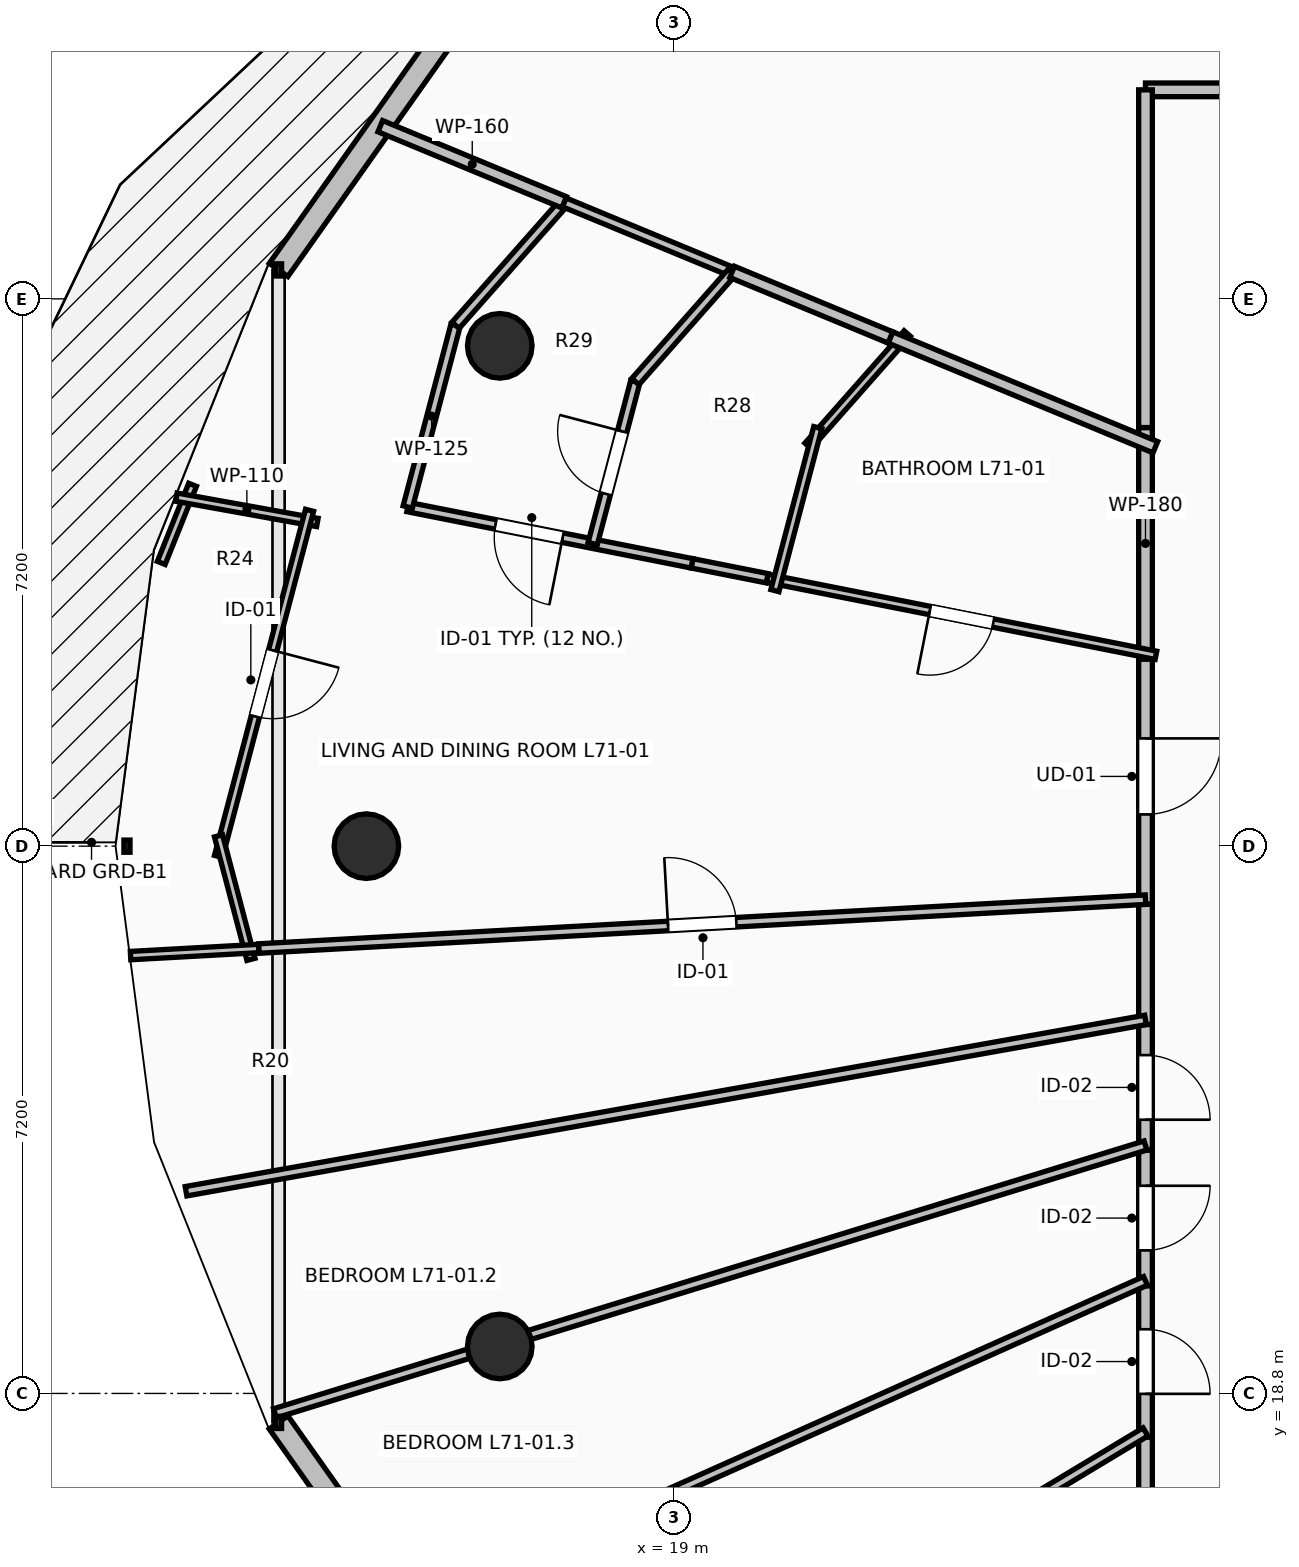
"""IFC4 building model, lengths in metres.
Left out: names, types, materials, properties, quantities, classifications, styles, units other than length and angle.
Written with IfcOpenShell. Run it as: python <this file> out.ifc"""

import sys

from ifc_helpers import new_model, si_unit, direction, frame, frame_2d, origin, origin_2d, place, context, subcontext, project, spatial, rectangle, circle, extrude, element, fill, save


model = new_model("IFC4")
c1 = context("Model", 3, precision=1e-05, world=origin(), true_north=direction((0.0, 1.0)))
c2 = subcontext(c1, "Body", "Model", "MODEL_VIEW")
j1 = project(units=[si_unit("LENGTHUNIT", "METRE"), si_unit("PLANEANGLEUNIT", "RADIAN")], contexts=[c1])
p1 = place(None, origin())
s1 = spatial("IfcSite", under=j1, at=p1, CompositionType="ELEMENT")
p2 = place(p1, origin())
s2 = spatial("IfcBuilding", under=s1, at=p2, CompositionType="ELEMENT")
p3 = place(p2, frame((0.0, 0.0, 262.65)))
s3 = spatial("IfcBuildingStorey", under=s2, at=p3, CompositionType="ELEMENT", Elevation=262.65)
for number, where, z_axis, x_axis in (
    (1, (16.705, 32.582, 0.0), (0.0, 0.0, 1.0), (-0.924, 0.383, 0.0)),
    (2, (14.95, 26.0, 0.0), (0.0, 0.0, 1.0), (-1.0, 0.0, 0.0)),
    (3, (16.705, 19.418, 0.0), (0.0, 0.0, 1.0), (-0.924, -0.383, 0.0)),
):
    element("IfcColumn", number, at=place(p3, frame(where, z_axis=z_axis, x_axis=x_axis)), inside=s3, PredefinedType="COLUMN", context=c2, shape_type="SweptSolid", body=[
        extrude(circle(Radius=0.425, at=origin_2d()), origin(), (0.0, 0.0, 1.0), 3.55),
    ])
p4 = place(p3, frame((16.216, 37.006, 0.0), z_axis=(0.0, 0.0, 1.0), x_axis=(-0.577261247247, -0.816559521668, 0.0)))
e4 = element("IfcWall", 4, at=p4, inside=s3, PredefinedType="STANDARD", context=c2, shape_type="SweptSolid", body=[
    extrude(rectangle(XDim=4.194, YDim=0.3, at=frame_2d((2.097, 0.0))), origin(), (0.0, 0.0, 1.0), 3.29),
])
p5 = place(p3, frame((13.794, 18.419, 0.0), z_axis=(0.0, 0.0, 1.0), x_axis=(0.577261247247, -0.816559521668, 0.0)))
e5 = element("IfcWall", 5, at=p5, inside=s3, PredefinedType="STANDARD", context=c2, shape_type="SweptSolid", body=[
    extrude(rectangle(XDim=4.194, YDim=0.3, at=frame_2d((2.097, 0.0))), origin(), (0.0, 0.0, 1.0), 3.29),
])
p6 = place(p5, frame((1.438, 0.0, 0.85)))
e6 = element("IfcOpeningElement", 6, at=p6, cuts=e5, PredefinedType="OPENING", context=c2, shape_type="SweptSolid", body=[
    extrude(rectangle(XDim=1.2, YDim=1.95, at=frame_2d((0.6, 0.975))), frame((0.0, 0.165, 0.0), z_axis=(0.0, -1.0, 0.0), x_axis=(1.0, 0.0, 0.0)), (0.0, 0.0, 1.0), 0.33),
])
p7 = place(p3, frame((25.2, 28.599, 0.0), z_axis=(0.0, 0.0, 1.0), x_axis=(0.0, -1.0, 0.0)))
e7 = element("IfcWall", 7, at=p7, inside=s3, PredefinedType="PARTITIONING", context=c2, shape_type="SweptSolid", body=[
    extrude(rectangle(XDim=3.363, YDim=0.18, at=frame_2d((1.682, 0.0))), origin(), (0.0, 0.0, 1.0), 2.482),
])
p8 = place(p7, frame((1.181, 0.0, 0.0)))
e8 = element("IfcOpeningElement", 8, at=p8, cuts=e7, PredefinedType="OPENING", context=c2, shape_type="SweptSolid", body=[
    extrude(rectangle(XDim=1.0, YDim=2.15, at=frame_2d((0.5, 1.075))), frame((0.0, 0.105, 0.0), z_axis=(0.0, -1.0, 0.0), x_axis=(1.0, 0.0, 0.0)), (0.0, 0.0, 1.0), 0.21),
])
p9 = place(p3, frame((25.2, 31.507, 0.0), z_axis=(0.0, 0.0, 1.0), x_axis=(0.0, -1.0, 0.0)))
e9 = element("IfcWall", 9, at=p9, inside=s3, PredefinedType="PARTITIONING", context=c2, shape_type="SweptSolid", body=[
    extrude(rectangle(XDim=3.048, YDim=0.18, at=frame_2d((1.524, 0.0))), origin(), (0.0, 0.0, 1.0), 2.482),
])
p10 = place(p3, frame((25.2, 25.236, 0.0), z_axis=(0.0, 0.0, 1.0), x_axis=(0.0, -1.0, 0.0)))
e10 = element("IfcWall", 10, at=p10, inside=s3, PredefinedType="PARTITIONING", context=c2, shape_type="SweptSolid", body=[
    extrude(rectangle(XDim=1.583, YDim=0.18, at=frame_2d((0.792, 0.0))), origin(), (0.0, 0.0, 1.0), 3.29),
])
p11 = place(p3, frame((25.2, 23.653, 0.0), z_axis=(0.0, 0.0, 1.0), x_axis=(0.0, -1.0, 0.0)))
e11 = element("IfcWall", 11, at=p11, inside=s3, PredefinedType="PARTITIONING", context=c2, shape_type="SweptSolid", body=[
    extrude(rectangle(XDim=1.654, YDim=0.18, at=frame_2d((0.827, 0.0))), origin(), (0.0, 0.0, 1.0), 3.29),
])
p12 = place(p11, frame((0.402, 0.0, 0.0)))
e12 = element("IfcOpeningElement", 12, at=p12, cuts=e11, PredefinedType="OPENING", context=c2, shape_type="SweptSolid", body=[
    extrude(rectangle(XDim=0.85, YDim=2.1, at=frame_2d((0.425, 1.05))), frame((0.0, 0.105, 0.0), z_axis=(0.0, -1.0, 0.0), x_axis=(1.0, 0.0, 0.0)), (0.0, 0.0, 1.0), 0.21),
])
p13 = place(p3, frame((25.2, 21.999, 0.0), z_axis=(0.0, 0.0, 1.0), x_axis=(0.0, -1.0, 0.0)))
e13 = element("IfcWall", 13, at=p13, inside=s3, PredefinedType="PARTITIONING", context=c2, shape_type="SweptSolid", body=[
    extrude(rectangle(XDim=1.784, YDim=0.18, at=frame_2d((0.892, 0.0))), origin(), (0.0, 0.0, 1.0), 3.29),
])
p14 = place(p13, frame((0.467, 0.0, 0.0)))
e14 = element("IfcOpeningElement", 14, at=p14, cuts=e13, PredefinedType="OPENING", context=c2, shape_type="SweptSolid", body=[
    extrude(rectangle(XDim=0.85, YDim=2.1, at=frame_2d((0.425, 1.05))), frame((0.0, 0.105, 0.0), z_axis=(0.0, -1.0, 0.0), x_axis=(1.0, 0.0, 0.0)), (0.0, 0.0, 1.0), 0.21),
])
p15 = place(p3, frame((25.2, 20.215, 0.0), z_axis=(0.0, 0.0, 1.0), x_axis=(0.0, -1.0, 0.0)))
e15 = element("IfcWall", 15, at=p15, inside=s3, PredefinedType="PARTITIONING", context=c2, shape_type="SweptSolid", body=[
    extrude(rectangle(XDim=1.991, YDim=0.18, at=frame_2d((0.996, 0.0))), origin(), (0.0, 0.0, 1.0), 3.29),
])
p16 = place(p15, frame((0.571, 0.0, 0.0)))
e16 = element("IfcOpeningElement", 16, at=p16, cuts=e15, PredefinedType="OPENING", context=c2, shape_type="SweptSolid", body=[
    extrude(rectangle(XDim=0.85, YDim=2.1, at=frame_2d((0.425, 1.05))), frame((0.0, 0.105, 0.0), z_axis=(0.0, -1.0, 0.0), x_axis=(1.0, 0.0, 0.0)), (0.0, 0.0, 1.0), 0.21),
])
p17 = place(p3, frame((25.2, 18.224, 0.0), z_axis=(0.0, 0.0, 1.0), x_axis=(0.0, -1.0, 0.0)))
e17 = element("IfcWall", 17, at=p17, inside=s3, PredefinedType="PARTITIONING", context=c2, shape_type="SweptSolid", body=[
    extrude(rectangle(XDim=2.309, YDim=0.18, at=frame_2d((1.155, 0.0))), origin(), (0.0, 0.0, 1.0), 2.482),
])
p18 = place(p17, frame((0.729, 0.0, 0.0)))
e18 = element("IfcOpeningElement", 18, at=p18, cuts=e17, PredefinedType="OPENING", context=c2, shape_type="SweptSolid", body=[
    extrude(rectangle(XDim=0.85, YDim=2.1, at=frame_2d((0.425, 1.05))), frame((0.0, 0.105, 0.0), z_axis=(0.0, -1.0, 0.0), x_axis=(1.0, 0.0, 0.0)), (0.0, 0.0, 1.0), 0.21),
])
p19 = place(p3, frame((33.814, 35.95, 0.0), z_axis=(0.0, 0.0, 1.0), x_axis=(-1.0, 0.0, 0.0)))
e19 = element("IfcWall", 19, at=p19, inside=s3, PredefinedType="PARTITIONING", context=c2, shape_type="SweptSolid", body=[
    extrude(rectangle(XDim=8.614, YDim=0.18, at=frame_2d((4.307, 0.0))), origin(), (0.0, 0.0, 1.0), 2.482),
])
p20 = place(p19, frame((3.807, 0.0, 0.0)))
e20 = element("IfcOpeningElement", 20, at=p20, cuts=e19, PredefinedType="OPENING", context=c2, shape_type="SweptSolid", body=[
    extrude(rectangle(XDim=1.0, YDim=2.15, at=frame_2d((0.5, 1.075))), frame((0.0, 0.105, 0.0), z_axis=(0.0, -1.0, 0.0), x_axis=(1.0, 0.0, 0.0)), (0.0, 0.0, 1.0), 0.21),
])
p21 = place(p3, frame((25.2, 35.95, 0.0), z_axis=(0.0, 0.0, 1.0), x_axis=(0.0, -1.0, 0.0)))
e21 = element("IfcWall", 21, at=p21, inside=s3, PredefinedType="PARTITIONING", context=c2, shape_type="SweptSolid", body=[
    extrude(rectangle(XDim=4.443, YDim=0.18, at=frame_2d((2.221, 0.0))), origin(), (0.0, 0.0, 1.0), 2.482),
])
p22 = place(p3, frame((19.236, 29.72, 0.0), z_axis=(0.0, 0.0, 1.0), x_axis=(-0.980906665774, 0.194479081243, 0.0)))
e22 = element("IfcWall", 22, at=p22, inside=s3, PredefinedType="PARTITIONING", context=c2, shape_type="SweptSolid", body=[
    extrude(rectangle(XDim=3.815, YDim=0.125, at=frame_2d((1.907, 0.0))), origin(), (0.0, 0.0, 1.0), 2.874),
])
p23 = place(p22, frame((1.737, 0.0, 0.0)))
e23 = element("IfcOpeningElement", 23, at=p23, cuts=e22, PredefinedType="OPENING", context=c2, shape_type="SweptSolid", body=[
    extrude(rectangle(XDim=0.9, YDim=2.1, at=frame_2d((0.45, 1.05))), frame((0.0, 0.077, 0.0), z_axis=(0.0, -1.0, 0.0), x_axis=(1.0, 0.0, 0.0)), (0.0, 0.0, 1.0), 0.155),
])
p24 = place(p3, frame((15.494, 30.462, 0.0), z_axis=(0.0, 0.0, 1.0), x_axis=(0.254459276467, 0.967083489995, 0.0)))
e24 = element("IfcWall", 24, at=p24, inside=s3, PredefinedType="PARTITIONING", context=c2, shape_type="SweptSolid", body=[
    extrude(rectangle(XDim=2.472, YDim=0.125, at=frame_2d((1.236, 0.0))), origin(), (0.0, 0.0, 1.0), 3.29),
])
p25 = place(p3, frame((16.123, 32.853, 0.0), z_axis=(0.0, 0.0, 1.0), x_axis=(0.662205183315, 0.749322557508, 0.0)))
e25 = element("IfcWall", 25, at=p25, inside=s3, PredefinedType="PARTITIONING", context=c2, shape_type="SweptSolid", body=[
    extrude(rectangle(XDim=2.158, YDim=0.125, at=frame_2d((1.079, 0.0))), origin(), (0.0, 0.0, 1.0), 3.29),
])
p26 = place(p3, frame((17.552, 34.47, 0.0), z_axis=(0.0, 0.0, 1.0), x_axis=(0.923932252837, -0.382556129434, 0.0)))
e26 = element("IfcWall", 26, at=p26, inside=s3, PredefinedType="PARTITIONING", context=c2, shape_type="SweptSolid", body=[
    extrude(rectangle(XDim=2.392, YDim=0.125, at=frame_2d((1.196, 0.0))), origin(), (0.0, 0.0, 1.0), 2.874),
])
p27 = place(p3, frame((25.337, 28.511, 0.0), z_axis=(0.0, 0.0, 1.0), x_axis=(-0.980930272027, 0.194359978959, 0.0)))
e27 = element("IfcWall", 27, at=p27, inside=s3, PredefinedType="PARTITIONING", context=c2, shape_type="SweptSolid", body=[
    extrude(rectangle(XDim=5.214, YDim=0.11, at=frame_2d((2.607, 0.0))), origin(), (0.0, 0.0, 1.0), 2.936),
])
p28 = place(p27, frame((2.182, 0.0, 0.0)))
e28 = element("IfcOpeningElement", 28, at=p28, cuts=e27, PredefinedType="OPENING", context=c2, shape_type="SweptSolid", body=[
    extrude(rectangle(XDim=0.85, YDim=2.1, at=frame_2d((0.425, 1.05))), frame((0.0, 0.07, 0.0), z_axis=(0.0, -1.0, 0.0), x_axis=(1.0, 0.0, 0.0)), (0.0, 0.0, 1.0), 0.14),
])
p29 = place(p3, frame((12.663, 30.754, 0.0), z_axis=(0.0, 0.0, 1.0), x_axis=(-0.372150787983, -0.928172285195, 0.0)))
e29 = element("IfcWall", 29, at=p29, inside=s3, PredefinedType="PARTITIONING", context=c2, shape_type="SweptSolid", body=[
    extrude(rectangle(XDim=1.107, YDim=0.11, at=frame_2d((0.554, 0.0))), origin(), (0.0, 0.0, 1.0), 3.29),
])
p30 = place(p3, frame((12.45, 30.592, 0.0), z_axis=(0.0, 0.0, 1.0), x_axis=(0.984212226867, -0.176992351488, 0.0)))
e30 = element("IfcWall", 30, at=p30, inside=s3, PredefinedType="PARTITIONING", context=c2, shape_type="SweptSolid", body=[
    extrude(rectangle(XDim=1.884, YDim=0.11, at=frame_2d((0.942, 0.0))), origin(), (0.0, 0.0, 1.0), 3.29),
])
p31 = place(p3, frame((14.203, 30.418, 0.0), z_axis=(0.0, 0.0, 1.0), x_axis=(-0.254460123068, -0.967083267236, 0.0)))
e31 = element("IfcWall", 31, at=p31, inside=s3, PredefinedType="PARTITIONING", context=c2, shape_type="SweptSolid", body=[
    extrude(rectangle(XDim=4.709, YDim=0.11, at=frame_2d((2.354, 0.0))), origin(), (0.0, 0.0, 1.0), 3.29),
])
p32 = place(p31, frame((1.904, 0.0, 0.0)))
e32 = element("IfcOpeningElement", 32, at=p32, cuts=e31, PredefinedType="OPENING", context=c2, shape_type="SweptSolid", body=[
    extrude(rectangle(XDim=0.9, YDim=2.1, at=frame_2d((0.45, 1.05))), frame((0.0, 0.07, 0.0), z_axis=(0.0, -1.0, 0.0), x_axis=(1.0, 0.0, 0.0)), (0.0, 0.0, 1.0), 0.14),
])
p33 = place(p3, frame((13.004, 26.135, 0.0), z_axis=(0.0, 0.0, 1.0), x_axis=(0.254278727694, -0.967130978018, 0.0)))
e33 = element("IfcWall", 33, at=p33, inside=s3, PredefinedType="PARTITIONING", context=c2, shape_type="SweptSolid", body=[
    extrude(rectangle(XDim=1.68, YDim=0.11, at=frame_2d((0.84, 0.0))), origin(), (0.0, 0.0, 1.0), 3.29),
])
p34 = place(p3, frame((13.536, 24.654, 0.0), z_axis=(0.0, 0.0, 1.0), x_axis=(-0.998470551828, -0.055286138695, 0.0)))
e34 = element("IfcWall", 34, at=p34, inside=s3, PredefinedType="PARTITIONING", context=c2, shape_type="SweptSolid", body=[
    extrude(rectangle(XDim=1.691, YDim=0.11, at=frame_2d((0.846, 0.0))), origin(), (0.0, 0.0, 1.0), 3.29),
])
p35 = place(p3, frame((20.223, 29.524, 0.0), z_axis=(0.0, 0.0, 1.0), x_axis=(-0.98086901598, 0.194668881667, 0.0)))
e35 = element("IfcWall", 35, at=p35, inside=s3, PredefinedType="PARTITIONING", context=c2, shape_type="SweptSolid", body=[
    extrude(rectangle(XDim=1.006, YDim=0.125, at=frame_2d((0.503, 0.0))), origin(), (0.0, 0.0, 1.0), 3.022),
])
p36 = place(p3, frame((13.536, 24.653, 0.0), z_axis=(0.0, 0.0, 1.0), x_axis=(0.998485968097, 0.055007013313, 0.0)))
e36 = element("IfcWall", 36, at=p36, inside=s3, PredefinedType="PARTITIONING", context=c2, shape_type="SweptSolid", body=[
    extrude(rectangle(XDim=11.682, YDim=0.125, at=frame_2d((5.841, 0.0))), origin(), (0.0, 0.0, 1.0), 2.874),
])
p37 = place(p36, frame((5.391, 0.0, 0.0)))
e37 = element("IfcOpeningElement", 37, at=p37, cuts=e36, PredefinedType="OPENING", context=c2, shape_type="SweptSolid", body=[
    extrude(rectangle(XDim=0.9, YDim=2.1, at=frame_2d((0.45, 1.05))), frame((0.0, 0.077, 0.0), z_axis=(0.0, -1.0, 0.0), x_axis=(1.0, 0.0, 0.0)), (0.0, 0.0, 1.0), 0.155),
])
p38 = place(p3, frame((17.552, 34.47, 0.0), z_axis=(0.0, 0.0, 1.0), x_axis=(-0.9239134198, 0.382601610965, 0.0)))
e38 = element("IfcWall", 38, at=p38, inside=s3, PredefinedType="PARTITIONING", context=c2, shape_type="SweptSolid", body=[
    extrude(rectangle(XDim=2.618, YDim=0.16, at=frame_2d((1.309, 0.0))), origin(), (0.0, 0.0, 1.0), 3.29),
])
p39 = place(p3, frame((17.927, 29.98, 0.0), z_axis=(0.0, 0.0, 1.0), x_axis=(0.254476946675, 0.967078840432, 0.0)))
e39 = element("IfcWall", 39, at=p39, inside=s3, PredefinedType="PARTITIONING", context=c2, shape_type="SweptSolid", body=[
    extrude(rectangle(XDim=2.205, YDim=0.125, at=frame_2d((1.102, 0.0))), origin(), (0.0, 0.0, 1.0), 2.482),
])
p40 = place(p39, frame((0.677, 0.0, 0.0)))
e40 = element("IfcOpeningElement", 40, at=p40, cuts=e39, PredefinedType="OPENING", context=c2, shape_type="SweptSolid", body=[
    extrude(rectangle(XDim=0.85, YDim=2.1, at=frame_2d((0.425, 1.05))), frame((0.0, 0.077, 0.0), z_axis=(0.0, -1.0, 0.0), x_axis=(1.0, 0.0, 0.0)), (0.0, 0.0, 1.0), 0.155),
])
p41 = place(p3, frame((18.488, 32.112, 0.0), z_axis=(0.0, 0.0, 1.0), x_axis=(0.661856531983, 0.749630529709, 0.0)))
e41 = element("IfcWall", 41, at=p41, inside=s3, PredefinedType="PARTITIONING", context=c2, shape_type="SweptSolid", body=[
    extrude(rectangle(XDim=1.925, YDim=0.125, at=frame_2d((0.962, 0.0))), origin(), (0.0, 0.0, 1.0), 2.482),
])
p42 = place(p3, frame((22.066, 32.744, 0.0), z_axis=(0.0, 0.0, 1.0), x_axis=(-0.662047420969, -0.749461948593, 0.0)))
e42 = element("IfcWall", 42, at=p42, inside=s3, PredefinedType="PARTITIONING", context=c2, shape_type="SweptSolid", body=[
    extrude(rectangle(XDim=1.972, YDim=0.11, at=frame_2d((0.986, 0.0))), origin(), (0.0, 0.0, 1.0), 3.29),
])
p43 = place(p3, frame((20.889, 31.506, 0.0), z_axis=(0.0, 0.0, 1.0), x_axis=(-0.254406599134, -0.967097348935, 0.0)))
e43 = element("IfcWall", 43, at=p43, inside=s3, PredefinedType="PARTITIONING", context=c2, shape_type="SweptSolid", body=[
    extrude(rectangle(XDim=2.218, YDim=0.11, at=frame_2d((1.109, 0.0))), origin(), (0.0, 0.0, 1.0), 2.482),
])
p44 = place(p3, frame((25.329, 31.248, 0.0), z_axis=(0.0, 0.0, 1.0), x_axis=(-0.923827524065, 0.382808967736, 0.0)))
e44 = element("IfcWall", 44, at=p44, inside=s3, PredefinedType="PARTITIONING", context=c2, shape_type="SweptSolid", body=[
    extrude(rectangle(XDim=3.773, YDim=0.16, at=frame_2d((1.886, 0.0))), origin(), (0.0, 0.0, 1.0), 2.936),
])
p45 = place(p3, frame((21.844, 32.693, 0.0), z_axis=(0.0, 0.0, 1.0), x_axis=(-0.92387949598, 0.382683520559, 0.0)))
e45 = element("IfcWall", 45, at=p45, inside=s3, PredefinedType="PARTITIONING", context=c2, shape_type="SweptSolid", body=[
    extrude(rectangle(XDim=2.253, YDim=0.16, at=frame_2d((1.127, 0.0))), origin(), (0.0, 0.0, 1.0), 3.022),
])
p46 = place(p3, frame((12.577, 21.46, 0.0), z_axis=(0.0, 0.0, 1.0), x_axis=(0.984427104809, 0.175793274383, 0.0)))
e46 = element("IfcWall", 46, at=p46, inside=s3, PredefinedType="PARTITIONING", context=c2, shape_type="SweptSolid", body=[
    extrude(rectangle(XDim=12.823, YDim=0.125, at=frame_2d((6.411, 0.0))), origin(), (0.0, 0.0, 1.0), 2.874),
])
p47 = place(p3, frame((13.747, 18.539, 0.0), z_axis=(0.0, 0.0, 1.0), x_axis=(0.955802794564, 0.294008533725, 0.0)))
e47 = element("IfcWall", 47, at=p47, inside=s3, PredefinedType="PARTITIONING", context=c2, shape_type="SweptSolid", body=[
    extrude(rectangle(XDim=11.982, YDim=0.125, at=frame_2d((5.991, 0.0))), origin(), (0.0, 0.0, 1.0), 2.482),
])
p48 = place(p3, frame((15.533, 15.962, 0.0), z_axis=(0.0, 0.0, 1.0), x_axis=(0.913015836792, 0.407924112756, 0.0)))
e48 = element("IfcWall", 48, at=p48, inside=s3, PredefinedType="PARTITIONING", context=c2, shape_type="SweptSolid", body=[
    extrude(rectangle(XDim=10.588, YDim=0.125, at=frame_2d((5.294, 0.0))), origin(), (0.0, 0.0, 1.0), 2.482),
])
p49 = place(p3, frame((17.602, 13.72, 0.0), z_axis=(0.0, 0.0, 1.0), x_axis=(0.856734134601, 0.515758298633, 0.0)))
e49 = element("IfcWall", 49, at=p49, inside=s3, PredefinedType="PARTITIONING", context=c2, shape_type="SweptSolid", body=[
    extrude(rectangle(XDim=8.868, YDim=0.125, at=frame_2d((4.434, 0.0))), origin(), (0.0, 0.0, 1.0), 2.482),
])
p50 = place(p8, origin())
e50 = element("IfcDoor", 50, at=p50, inside=s3, OperationType="SINGLE_SWING_LEFT", PredefinedType="DOOR", context=c2, shape_type="SweptSolid", body=[
    extrude(rectangle(XDim=1.0, YDim=2.15, at=frame_2d((0.5, 1.075))), frame((0.0, 0.025, 0.0), z_axis=(0.0, -1.0, 0.0), x_axis=(1.0, 0.0, 0.0)), (0.0, 0.0, 1.0), 0.05),
])
fill(e8, e50)
p51 = place(p23, origin())
e51 = element("IfcDoor", 51, at=p51, inside=s3, OperationType="SINGLE_SWING_LEFT", PredefinedType="DOOR", context=c2, shape_type="SweptSolid", body=[
    extrude(rectangle(XDim=0.9, YDim=2.1, at=frame_2d((0.45, 1.05))), frame((0.0, 0.025, 0.0), z_axis=(0.0, -1.0, 0.0), x_axis=(1.0, 0.0, 0.0)), (0.0, 0.0, 1.0), 0.05),
])
fill(e23, e51)
p52 = place(p28, origin())
e52 = element("IfcDoor", 52, at=p52, inside=s3, OperationType="SINGLE_SWING_RIGHT", PredefinedType="DOOR", context=c2, shape_type="SweptSolid", body=[
    extrude(rectangle(XDim=0.85, YDim=2.1, at=frame_2d((0.425, 1.05))), frame((0.0, 0.025, 0.0), z_axis=(0.0, -1.0, 0.0), x_axis=(1.0, 0.0, 0.0)), (0.0, 0.0, 1.0), 0.05),
])
fill(e28, e52)
p53 = place(p32, origin())
e53 = element("IfcDoor", 53, at=p53, inside=s3, OperationType="SINGLE_SWING_LEFT", PredefinedType="DOOR", context=c2, shape_type="SweptSolid", body=[
    extrude(rectangle(XDim=0.9, YDim=2.1, at=frame_2d((0.45, 1.05))), frame((0.0, 0.025, 0.0), z_axis=(0.0, -1.0, 0.0), x_axis=(1.0, 0.0, 0.0)), (0.0, 0.0, 1.0), 0.05),
])
fill(e32, e53)
p54 = place(p37, origin())
e54 = element("IfcDoor", 54, at=p54, inside=s3, OperationType="SINGLE_SWING_LEFT", PredefinedType="DOOR", context=c2, shape_type="SweptSolid", body=[
    extrude(rectangle(XDim=0.9, YDim=2.1, at=frame_2d((0.45, 1.05))), frame((0.0, 0.025, 0.0), z_axis=(0.0, -1.0, 0.0), x_axis=(1.0, 0.0, 0.0)), (0.0, 0.0, 1.0), 0.05),
])
fill(e37, e54)
p55 = place(p12, origin())
e55 = element("IfcDoor", 55, at=p55, inside=s3, OperationType="SINGLE_SWING_RIGHT", PredefinedType="DOOR", context=c2, shape_type="SweptSolid", body=[
    extrude(rectangle(XDim=0.85, YDim=2.1, at=frame_2d((0.425, 1.05))), frame((0.0, 0.025, 0.0), z_axis=(0.0, -1.0, 0.0), x_axis=(1.0, 0.0, 0.0)), (0.0, 0.0, 1.0), 0.05),
])
fill(e12, e55)
p56 = place(p14, origin())
e56 = element("IfcDoor", 56, at=p56, inside=s3, OperationType="SINGLE_SWING_LEFT", PredefinedType="DOOR", context=c2, shape_type="SweptSolid", body=[
    extrude(rectangle(XDim=0.85, YDim=2.1, at=frame_2d((0.425, 1.05))), frame((0.0, 0.025, 0.0), z_axis=(0.0, -1.0, 0.0), x_axis=(1.0, 0.0, 0.0)), (0.0, 0.0, 1.0), 0.05),
])
fill(e14, e56)
p57 = place(p16, origin())
e57 = element("IfcDoor", 57, at=p57, inside=s3, OperationType="SINGLE_SWING_RIGHT", PredefinedType="DOOR", context=c2, shape_type="SweptSolid", body=[
    extrude(rectangle(XDim=0.85, YDim=2.1, at=frame_2d((0.425, 1.05))), frame((0.0, 0.025, 0.0), z_axis=(0.0, -1.0, 0.0), x_axis=(1.0, 0.0, 0.0)), (0.0, 0.0, 1.0), 0.05),
])
fill(e16, e57)
p58 = place(p40, origin())
e58 = element("IfcDoor", 58, at=p58, inside=s3, OperationType="SINGLE_SWING_RIGHT", PredefinedType="DOOR", context=c2, shape_type="SweptSolid", body=[
    extrude(rectangle(XDim=0.85, YDim=2.1, at=frame_2d((0.425, 1.05))), frame((0.0, 0.025, 0.0), z_axis=(0.0, -1.0, 0.0), x_axis=(1.0, 0.0, 0.0)), (0.0, 0.0, 1.0), 0.05),
])
fill(e40, e58)
save(model, sys.argv[1])
